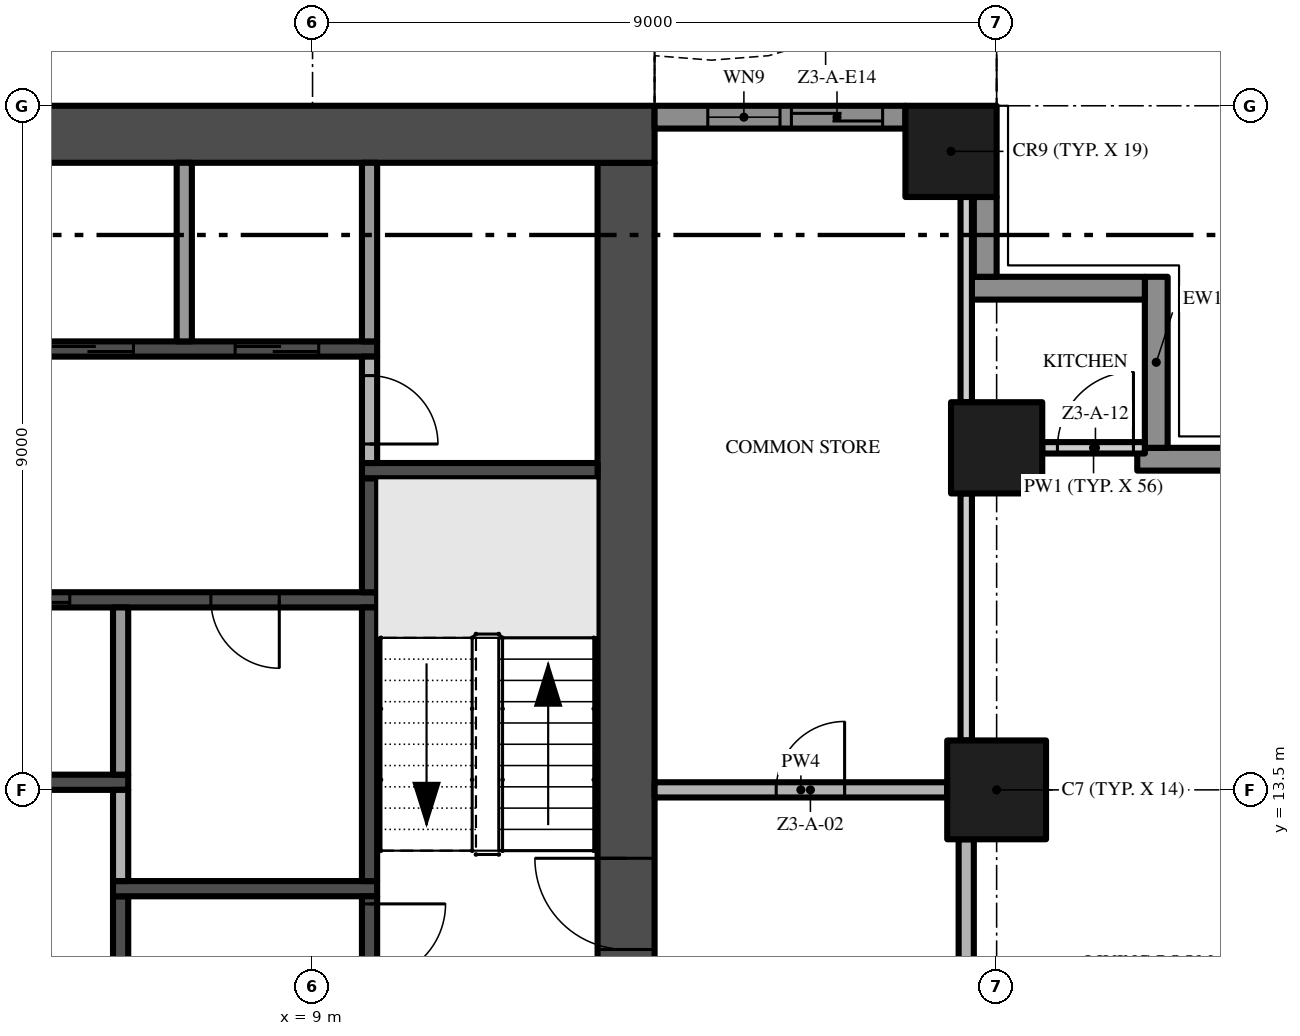
"""IFC4 building model, lengths in metres.
Left out: names, types, materials, properties, quantities, classifications, styles, units other than length and angle.
Written with IfcOpenShell. Run it as: python <this file> out.ifc"""

import sys

from ifc_helpers import new_model, si_unit, direction, frame, frame_2d, origin, origin_2d, place, context, subcontext, project, spatial, polyline, rectangle, outline, extrude, element, fill, save


model = new_model("IFC4")
c1 = context("Model", 3, precision=1e-05, world=origin(), true_north=direction((0.0, 1.0)))
c2 = subcontext(c1, "Body", "Model", "MODEL_VIEW")
j1 = project(units=[si_unit("LENGTHUNIT", "METRE"), si_unit("PLANEANGLEUNIT", "RADIAN")], contexts=[c1])
p1 = place(None, origin())
s1 = spatial("IfcSite", under=j1, at=p1, CompositionType="ELEMENT")
p2 = place(p1, origin())
s2 = spatial("IfcBuilding", under=s1, at=p2, CompositionType="ELEMENT")
p3 = place(p2, frame((0.0, 0.0, 128.8)))
s3 = spatial("IfcBuildingStorey", under=s2, at=p3, CompositionType="ELEMENT", Elevation=128.8)
p4 = place(p3, frame((13.125, 5.25, -0.3), z_axis=(0.0, 0.0, 1.0), x_axis=(0.0, 1.0, 0.0)))
e1 = element("IfcWall", 1, at=p4, inside=s3, PredefinedType="SHEAR", context=c2, shape_type="SweptSolid", body=[
    extrude(rectangle(XDim=16.5, YDim=0.75, at=frame_2d((8.25, 0.0))), origin(), (0.0, 0.0, 1.0), 3.8),
])
p5 = place(p4, frame((6.15, 0.0, 0.3)))
e2 = element("IfcOpeningElement", 2, at=p5, cuts=e1, PredefinedType="OPENING", context=c2, shape_type="SweptSolid", body=[
    extrude(rectangle(XDim=1.2, YDim=2.2, at=frame_2d((0.6, 1.1))), frame((0.0, 0.385, 0.0), z_axis=(0.0, -1.0, 0.0), x_axis=(1.0, 0.0, 0.0)), (0.0, 0.0, 1.0), 0.77),
])
p6 = place(p3, frame((13.5, 22.125, -0.3), z_axis=(0.0, 0.0, 1.0), x_axis=(-1.0, 0.0, 0.0)))
e3 = element("IfcWall", 3, at=p6, inside=s3, PredefinedType="SHEAR", context=c2, shape_type="SweptSolid", body=[
    extrude(rectangle(XDim=27.0, YDim=0.75, at=frame_2d((13.5, 0.0))), origin(), (0.0, 0.0, 1.0), 3.8),
])
p7 = place(p3, frame((18.0, 13.5, 0.0), z_axis=(0.0, 0.0, 1.0), x_axis=(1.0, 0.0, 0.0)))
e4 = element("IfcColumn", 4, at=p7, inside=s3, PredefinedType="COLUMN", context=c2, shape_type="SweptSolid", body=[
    extrude(rectangle(XDim=1.3, YDim=1.3, at=origin_2d()), origin(), (0.0, 0.0, 1.0), 3.5),
])
for number, where, z_axis, x_axis in (
    (5, (17.4, 21.9, 0.0), (0.0, 0.0, 1.0), (1.0, 0.0, 0.0)),
    (6, (18.0, 18.0, 0.0), (0.0, 0.0, 1.0), (1.0, 0.0, 0.0)),
):
    element("IfcColumn", number, at=place(p3, frame(where, z_axis=z_axis, x_axis=x_axis)), inside=s3, PredefinedType="COLUMN", context=c2, shape_type="SweptSolid", body=[
        extrude(rectangle(XDim=1.2, YDim=1.2, at=origin_2d()), origin(), (0.0, 0.0, 1.0), 3.5),
    ])
p8 = place(p3, frame((19.85, 17.85, 0.0), z_axis=(0.0, 0.0, 1.0), x_axis=(1.0, 0.0, 0.0)))
e7 = element("IfcWall", 7, at=p8, inside=s3, PredefinedType="SOLIDWALL", context=c2, shape_type="SweptSolid", body=[
    extrude(rectangle(XDim=2.35, YDim=0.3, at=frame_2d((1.175, 0.0))), origin(), (0.0, 0.0, 1.0), 3.5),
])
p9 = place(p3, frame((20.1, 20.25, 0.0), z_axis=(0.0, 0.0, 1.0), x_axis=(0.0, -1.0, 0.0)))
e8 = element("IfcWall", 8, at=p9, inside=s3, PredefinedType="SOLIDWALL", context=c2, shape_type="SweptSolid", body=[
    extrude(rectangle(XDim=2.25, YDim=0.3, at=frame_2d((1.125, 0.0))), origin(), (0.0, 0.0, 1.0), 3.5),
])
p10 = place(p3, frame((17.6, 20.1, 0.0), z_axis=(0.0, 0.0, 1.0), x_axis=(1.0, 0.0, 0.0)))
e9 = element("IfcWall", 9, at=p10, inside=s3, PredefinedType="SOLIDWALL", context=c2, shape_type="SweptSolid", body=[
    extrude(rectangle(XDim=2.35, YDim=0.3, at=frame_2d((1.175, 0.0))), origin(), (0.0, 0.0, 1.0), 3.5),
])
p11 = place(p3, frame((17.85, 21.3, 0.0), z_axis=(0.0, 0.0, 1.0), x_axis=(0.0, -1.0, 0.0)))
e10 = element("IfcWall", 10, at=p11, inside=s3, PredefinedType="SOLIDWALL", context=c2, shape_type="SweptSolid", body=[
    extrude(rectangle(XDim=1.05, YDim=0.3, at=frame_2d((0.525, 0.0))), origin(), (0.0, 0.0, 1.0), 3.5),
])
p12 = place(p3, frame((13.5, 22.35, 0.0), z_axis=(0.0, 0.0, 1.0), x_axis=(1.0, 0.0, 0.0)))
e11 = element("IfcWall", 11, at=p12, inside=s3, PredefinedType="SOLIDWALL", context=c2, shape_type="SweptSolid", body=[
    extrude(rectangle(XDim=3.3, YDim=0.3, at=frame_2d((1.65, 0.0))), origin(), (0.0, 0.0, 1.0), 3.5),
])
p13 = place(p12, frame((1.8, 0.0, 0.0)))
e12 = element("IfcOpeningElement", 12, at=p13, cuts=e11, PredefinedType="OPENING", context=c2, shape_type="SweptSolid", body=[
    extrude(rectangle(XDim=1.2, YDim=2.4, at=frame_2d((0.6, 1.2))), frame((0.0, 0.16, 0.0), z_axis=(0.0, -1.0, 0.0), x_axis=(1.0, 0.0, 0.0)), (0.0, 0.0, 1.0), 0.32),
])
p14 = place(p12, frame((0.7, 0.0, 0.45)))
e13 = element("IfcOpeningElement", 13, at=p14, cuts=e11, PredefinedType="OPENING", context=c2, shape_type="SweptSolid", body=[
    extrude(rectangle(XDim=0.95, YDim=2.65, at=frame_2d((0.475, 1.325))), frame((0.0, 0.16, 0.0), z_axis=(0.0, -1.0, 0.0), x_axis=(1.0, 0.0, 0.0)), (0.0, 0.0, 1.0), 0.32),
])
p15 = place(p3, origin())
e14 = element("IfcWall", 14, at=p15, inside=s3, PredefinedType="USERDEFINED", context=c2, shape_type="SweptSolid", body=[
    extrude(outline(polyline([(18.0, 24.3), (16.5, 23.595), (15.0, 23.159), (14.25, 23.1), (13.5, 23.159), (13.48, 22.909), (14.25, 22.849), (15.045, 22.911), (16.589, 23.36), (18.106, 24.074), (18.0, 24.3)])), origin(), (0.0, 0.0, 1.0), 0.9),
])
p16 = place(p3, frame((-9.85, 19.3, 0.0), z_axis=(0.0, 0.0, 1.0), x_axis=(1.0, 0.0, 0.0)))
e15 = element("IfcWall", 15, at=p16, inside=s3, PredefinedType="SHEAR", context=c2, shape_type="SweptSolid", body=[
    extrude(rectangle(XDim=19.7, YDim=0.2, at=frame_2d((9.85, 0.0))), origin(), (0.0, 0.0, 1.0), 3.5),
])
p17 = place(p16, frame((10.519, 0.0, 0.0)))
e16 = element("IfcOpeningElement", 16, at=p17, cuts=e15, PredefinedType="OPENING", context=c2, shape_type="SweptSolid", body=[
    extrude(rectangle(XDim=1.1, YDim=2.1, at=frame_2d((0.55, 1.05))), frame((0.0, 0.11, 0.0), z_axis=(0.0, -1.0, 0.0), x_axis=(1.0, 0.0, 0.0)), (0.0, 0.0, 1.0), 0.22),
])
p18 = place(p16, frame((12.956, 0.0, 0.0)))
e17 = element("IfcOpeningElement", 17, at=p18, cuts=e15, PredefinedType="OPENING", context=c2, shape_type="SweptSolid", body=[
    extrude(rectangle(XDim=1.1, YDim=2.1, at=frame_2d((0.55, 1.05))), frame((0.0, 0.11, 0.0), z_axis=(0.0, -1.0, 0.0), x_axis=(1.0, 0.0, 0.0)), (0.0, 0.0, 1.0), 0.22),
])
p19 = place(p16, frame((15.394, 0.0, 0.0)))
e18 = element("IfcOpeningElement", 18, at=p19, cuts=e15, PredefinedType="OPENING", context=c2, shape_type="SweptSolid", body=[
    extrude(rectangle(XDim=1.1, YDim=2.1, at=frame_2d((0.55, 1.05))), frame((0.0, 0.11, 0.0), z_axis=(0.0, -1.0, 0.0), x_axis=(1.0, 0.0, 0.0)), (0.0, 0.0, 1.0), 0.22),
])
p20 = place(p16, frame((17.831, 0.0, 0.0)))
e19 = element("IfcOpeningElement", 19, at=p20, cuts=e15, PredefinedType="OPENING", context=c2, shape_type="SweptSolid", body=[
    extrude(rectangle(XDim=1.1, YDim=2.1, at=frame_2d((0.55, 1.05))), frame((0.0, 0.11, 0.0), z_axis=(0.0, -1.0, 0.0), x_axis=(1.0, 0.0, 0.0)), (0.0, 0.0, 1.0), 0.22),
])
p21 = place(p16, frame((3.306, 0.0, 0.0)))
e20 = element("IfcOpeningElement", 20, at=p21, cuts=e15, PredefinedType="OPENING", context=c2, shape_type="SweptSolid", body=[
    extrude(rectangle(XDim=0.9, YDim=2.1, at=frame_2d((0.45, 1.05))), frame((0.0, 0.11, 0.0), z_axis=(0.0, -1.0, 0.0), x_axis=(1.0, 0.0, 0.0)), (0.0, 0.0, 1.0), 0.22),
])
p22 = place(p16, frame((8.181, 0.0, 0.0)))
e21 = element("IfcOpeningElement", 21, at=p22, cuts=e15, PredefinedType="OPENING", context=c2, shape_type="SweptSolid", body=[
    extrude(rectangle(XDim=0.9, YDim=2.1, at=frame_2d((0.45, 1.05))), frame((0.0, 0.11, 0.0), z_axis=(0.0, -1.0, 0.0), x_axis=(1.0, 0.0, 0.0)), (0.0, 0.0, 1.0), 0.22),
])
p23 = place(p3, frame((1.5, 13.6, 0.0), z_axis=(0.0, 0.0, 1.0), x_axis=(1.0, 0.0, 0.0)))
e22 = element("IfcWall", 22, at=p23, inside=s3, PredefinedType="SHEAR", context=c2, shape_type="SweptSolid", body=[
    extrude(rectangle(XDim=5.075, YDim=0.2, at=frame_2d((2.538, 0.0))), origin(), (0.0, 0.0, 1.0), 3.5),
])
p24 = place(p3, frame((9.85, 16.0, 0.0), z_axis=(0.0, 0.0, 1.0), x_axis=(-1.0, 0.0, 0.0)))
e23 = element("IfcWall", 23, at=p24, inside=s3, PredefinedType="SHEAR", context=c2, shape_type="SweptSolid", body=[
    extrude(rectangle(XDim=8.35, YDim=0.2, at=frame_2d((4.175, 0.0))), origin(), (0.0, 0.0, 1.0), 3.5),
])
p25 = place(p24, frame((6.481, 0.0, 0.0)))
e24 = element("IfcOpeningElement", 24, at=p25, cuts=e23, PredefinedType="OPENING", context=c2, shape_type="SweptSolid", body=[
    extrude(rectangle(XDim=1.1, YDim=2.1, at=frame_2d((0.55, 1.05))), frame((0.0, 0.11, 0.0), z_axis=(0.0, -1.0, 0.0), x_axis=(1.0, 0.0, 0.0)), (0.0, 0.0, 1.0), 0.22),
])
p26 = place(p24, frame((4.044, 0.0, 0.0)))
e25 = element("IfcOpeningElement", 25, at=p26, cuts=e23, PredefinedType="OPENING", context=c2, shape_type="SweptSolid", body=[
    extrude(rectangle(XDim=1.1, YDim=2.1, at=frame_2d((0.55, 1.05))), frame((0.0, 0.11, 0.0), z_axis=(0.0, -1.0, 0.0), x_axis=(1.0, 0.0, 0.0)), (0.0, 0.0, 1.0), 0.22),
])
p27 = place(p24, frame((1.288, 0.0, 0.0)))
e26 = element("IfcOpeningElement", 26, at=p27, cuts=e23, PredefinedType="OPENING", context=c2, shape_type="SweptSolid", body=[
    extrude(rectangle(XDim=0.9, YDim=2.1, at=frame_2d((0.45, 1.05))), frame((0.0, 0.11, 0.0), z_axis=(0.0, -1.0, 0.0), x_axis=(1.0, 0.0, 0.0)), (0.0, 0.0, 1.0), 0.22),
])
p28 = place(p3, frame((6.475, 9.4, 0.0), z_axis=(0.0, 0.0, 1.0), x_axis=(0.0, 1.0, 0.0)))
e27 = element("IfcWall", 27, at=p28, inside=s3, PredefinedType="SHEAR", context=c2, shape_type="SweptSolid", body=[
    extrude(rectangle(XDim=2.7, YDim=0.2, at=frame_2d((1.35, 0.0))), origin(), (0.0, 0.0, 1.0), 3.5),
])
p29 = place(p3, frame((6.375, 12.2, 0.0), z_axis=(0.0, 0.0, 1.0), x_axis=(1.0, 0.0, 0.0)))
e28 = element("IfcWall", 28, at=p29, inside=s3, PredefinedType="SHEAR", context=c2, shape_type="SweptSolid", body=[
    extrude(rectangle(XDim=3.475, YDim=0.2, at=frame_2d((1.738, 0.0))), origin(), (0.0, 0.0, 1.0), 3.5),
])
p30 = place(p3, frame((6.475, 12.3, 0.0), z_axis=(0.0, 0.0, 1.0), x_axis=(0.0, 1.0, 0.0)))
e29 = element("IfcWall", 29, at=p30, inside=s3, PredefinedType="PARTITIONING", context=c2, shape_type="SweptSolid", body=[
    extrude(rectangle(XDim=1.2, YDim=0.2, at=frame_2d((0.6, 0.0))), origin(), (0.0, 0.0, 1.0), 3.5),
])
p31 = place(p3, frame((6.475, 13.7, 0.0), z_axis=(0.0, 0.0, 1.0), x_axis=(0.0, 1.0, 0.0)))
e30 = element("IfcWall", 30, at=p31, inside=s3, PredefinedType="PARTITIONING", context=c2, shape_type="SweptSolid", body=[
    extrude(rectangle(XDim=2.2, YDim=0.2, at=frame_2d((1.1, 0.0))), origin(), (0.0, 0.0, 1.0), 3.5),
])
p32 = place(p3, frame((7.312, 19.4, 0.0), z_axis=(0.0, 0.0, 1.0), x_axis=(0.0, 1.0, 0.0)))
e31 = element("IfcWall", 31, at=p32, inside=s3, PredefinedType="PARTITIONING", context=c2, shape_type="SweptSolid", body=[
    extrude(rectangle(XDim=2.35, YDim=0.2, at=frame_2d((1.175, 0.0))), origin(), (0.0, 0.0, 1.0), 3.5),
])
p33 = place(p3, frame((9.75, 12.1, 0.0), z_axis=(0.0, 0.0, 1.0), x_axis=(0.0, -1.0, 0.0)))
e32 = element("IfcWall", 32, at=p33, inside=s3, PredefinedType="SHEAR", context=c2, shape_type="SweptSolid", body=[
    extrude(rectangle(XDim=1.9, YDim=0.2, at=frame_2d((0.95, 0.0))), origin(), (0.0, 0.0, 1.0), 3.5),
])
p34 = place(p33, frame((0.1, 0.0, 0.0)))
e33 = element("IfcOpeningElement", 33, at=p34, cuts=e32, PredefinedType="OPENING", context=c2, shape_type="SweptSolid", body=[
    extrude(rectangle(XDim=1.0, YDim=2.2, at=frame_2d((0.5, 1.1))), frame((0.0, 0.11, 0.0), z_axis=(0.0, -1.0, 0.0), x_axis=(1.0, 0.0, 0.0)), (0.0, 0.0, 1.0), 0.22),
])
p35 = place(p3, frame((9.75, 12.3, 0.0), z_axis=(0.0, 0.0, 1.0), x_axis=(0.0, 1.0, 0.0)))
e34 = element("IfcWall", 34, at=p35, inside=s3, PredefinedType="SHEAR", context=c2, shape_type="SweptSolid", body=[
    extrude(rectangle(XDim=3.6, YDim=0.2, at=frame_2d((1.8, 0.0))), origin(), (0.0, 0.0, 1.0), 3.5),
])
p36 = place(p3, frame((9.75, 16.1, 0.0), z_axis=(0.0, 0.0, 1.0), x_axis=(0.0, 1.0, 0.0)))
e35 = element("IfcWall", 35, at=p36, inside=s3, PredefinedType="SHEAR", context=c2, shape_type="SweptSolid", body=[
    extrude(rectangle(XDim=1.5, YDim=0.2, at=frame_2d((0.75, 0.0))), origin(), (0.0, 0.0, 1.0), 3.5),
])
p37 = place(p3, frame((9.65, 17.7, 0.0), z_axis=(0.0, 0.0, 1.0), x_axis=(1.0, 0.0, 0.0)))
e36 = element("IfcWall", 36, at=p37, inside=s3, PredefinedType="SHEAR", context=c2, shape_type="SweptSolid", body=[
    extrude(rectangle(XDim=3.1, YDim=0.2, at=frame_2d((1.55, 0.0))), origin(), (0.0, 0.0, 1.0), 3.5),
])
p38 = place(p3, frame((9.75, 19.2, 0.0), z_axis=(0.0, 0.0, 1.0), x_axis=(0.0, -1.0, 0.0)))
e37 = element("IfcWall", 37, at=p38, inside=s3, PredefinedType="PARTITIONING", context=c2, shape_type="SweptSolid", body=[
    extrude(rectangle(XDim=1.4, YDim=0.2, at=frame_2d((0.7, 0.0))), origin(), (0.0, 0.0, 1.0), 3.5),
])
p39 = place(p38, frame((0.25, 0.0, 0.0)))
e38 = element("IfcOpeningElement", 38, at=p39, cuts=e37, PredefinedType="OPENING", context=c2, shape_type="SweptSolid", body=[
    extrude(rectangle(XDim=0.9, YDim=2.1, at=frame_2d((0.45, 1.05))), frame((0.0, 0.11, 0.0), z_axis=(0.0, -1.0, 0.0), x_axis=(1.0, 0.0, 0.0)), (0.0, 0.0, 1.0), 0.22),
])
p40 = place(p3, frame((9.75, 19.4, 0.0), z_axis=(0.0, 0.0, 1.0), x_axis=(0.0, 1.0, 0.0)))
e39 = element("IfcWall", 39, at=p40, inside=s3, PredefinedType="PARTITIONING", context=c2, shape_type="SweptSolid", body=[
    extrude(rectangle(XDim=2.35, YDim=0.2, at=frame_2d((1.175, 0.0))), origin(), (0.0, 0.0, 1.0), 3.5),
])
p41 = place(p3, frame((13.5, 13.5, 0.0), z_axis=(0.0, 0.0, 1.0), x_axis=(1.0, 0.0, 0.0)))
e40 = element("IfcWall", 40, at=p41, inside=s3, PredefinedType="PARTITIONING", context=c2, shape_type="SweptSolid", body=[
    extrude(rectangle(XDim=3.85, YDim=0.2, at=frame_2d((1.925, 0.0))), origin(), (0.0, 0.0, 1.0), 3.5),
])
p42 = place(p41, frame((1.6, 0.0, 0.0)))
e41 = element("IfcOpeningElement", 41, at=p42, cuts=e40, PredefinedType="OPENING", context=c2, shape_type="SweptSolid", body=[
    extrude(rectangle(XDim=0.9, YDim=2.1, at=frame_2d((0.45, 1.05))), frame((0.0, 0.11, 0.0), z_axis=(0.0, -1.0, 0.0), x_axis=(1.0, 0.0, 0.0)), (0.0, 0.0, 1.0), 0.22),
])
p43 = place(p3, frame((18.6, 18.0, 0.0), z_axis=(0.0, 0.0, 1.0), x_axis=(1.0, 0.0, 0.0)))
e42 = element("IfcWall", 42, at=p43, inside=s3, PredefinedType="PARTITIONING", context=c2, shape_type="SweptSolid", body=[
    extrude(rectangle(XDim=1.35, YDim=0.15, at=frame_2d((0.675, 0.0))), origin(), (0.0, 0.0, 1.0), 3.5),
])
p44 = place(p43, frame((0.2, 0.0, 0.0)))
e43 = element("IfcOpeningElement", 43, at=p44, cuts=e42, PredefinedType="OPENING", context=c2, shape_type="SweptSolid", body=[
    extrude(rectangle(XDim=1.0, YDim=2.4, at=frame_2d((0.5, 1.2))), frame((0.0, 0.085, 0.0), z_axis=(0.0, -1.0, 0.0), x_axis=(1.0, 0.0, 0.0)), (0.0, 0.0, 1.0), 0.17),
])
p45 = place(p3, frame((17.6, 12.85, 0.0), z_axis=(0.0, 0.0, 1.0), x_axis=(0.0, -1.0, 0.0)))
e44 = element("IfcWall", 44, at=p45, inside=s3, PredefinedType="PARTITIONING", context=c2, shape_type="SweptSolid", body=[
    extrude(rectangle(XDim=7.7, YDim=0.2, at=frame_2d((3.85, 0.0))), origin(), (0.0, 0.0, 1.0), 3.5),
])
p46 = place(p45, frame((5.5, 0.0, 0.0)))
e45 = element("IfcOpeningElement", 45, at=p46, cuts=e44, PredefinedType="OPENING", context=c2, shape_type="SweptSolid", body=[
    extrude(rectangle(XDim=1.2, YDim=2.4, at=frame_2d((0.6, 1.2))), frame((0.0, 0.11, 0.0), z_axis=(0.0, -1.0, 0.0), x_axis=(1.0, 0.0, 0.0)), (0.0, 0.0, 1.0), 0.22),
])
p47 = place(p3, frame((17.6, 14.15, 0.0), z_axis=(0.0, 0.0, 1.0), x_axis=(0.0, 1.0, 0.0)))
e46 = element("IfcWall", 46, at=p47, inside=s3, PredefinedType="PARTITIONING", context=c2, shape_type="SweptSolid", body=[
    extrude(rectangle(XDim=3.25, YDim=0.15, at=frame_2d((1.625, 0.0))), origin(), (0.0, 0.0, 1.0), 3.5),
])
p48 = place(p3, frame((17.6, 18.6, 0.0), z_axis=(0.0, 0.0, 1.0), x_axis=(0.0, 1.0, 0.0)))
e47 = element("IfcWall", 47, at=p48, inside=s3, PredefinedType="PARTITIONING", context=c2, shape_type="SweptSolid", body=[
    extrude(rectangle(XDim=2.7, YDim=0.15, at=frame_2d((1.35, 0.0))), origin(), (0.0, 0.0, 1.0), 3.5),
])
p49 = place(p13, origin())
e48 = element("IfcDoor", 48, at=p49, inside=s3, OperationType="SINGLE_SWING_LEFT", PredefinedType="DOOR", context=c2, shape_type="SweptSolid", body=[
    extrude(rectangle(XDim=1.2, YDim=2.4, at=frame_2d((0.6, 1.2))), frame((0.0, 0.025, 0.0), z_axis=(0.0, -1.0, 0.0), x_axis=(1.0, 0.0, 0.0)), (0.0, 0.0, 1.0), 0.05),
])
fill(e12, e48)
p50 = place(p14, origin())
e49 = element("IfcWindow", 49, at=p50, inside=s3, PartitioningType="SINGLE_PANEL", PredefinedType="WINDOW", context=c2, shape_type="SweptSolid", body=[
    extrude(rectangle(XDim=0.95, YDim=2.65, at=frame_2d((0.475, 1.325))), frame((0.0, 0.03, 0.0), z_axis=(0.0, -1.0, 0.0), x_axis=(1.0, 0.0, 0.0)), (0.0, 0.0, 1.0), 0.06),
])
fill(e13, e49)
p51 = place(p5, frame((1.2, 0.0, 0.0), z_axis=(0.0, 0.0, 1.0), x_axis=(-1.0, 0.0, 0.0)))
e50 = element("IfcDoor", 50, at=p51, inside=s3, OperationType="SINGLE_SWING_LEFT", PredefinedType="DOOR", context=c2, shape_type="SweptSolid", body=[
    extrude(rectangle(XDim=1.2, YDim=2.2, at=frame_2d((0.6, 1.1))), frame((0.0, 0.025, 0.0), z_axis=(0.0, -1.0, 0.0), x_axis=(1.0, 0.0, 0.0)), (0.0, 0.0, 1.0), 0.05),
])
fill(e2, e50)
p52 = place(p34, origin())
e51 = element("IfcDoor", 51, at=p52, inside=s3, OperationType="SINGLE_SWING_LEFT", PredefinedType="DOOR", context=c2, shape_type="SweptSolid", body=[
    extrude(rectangle(XDim=1.0, YDim=2.2, at=frame_2d((0.5, 1.1))), frame((0.0, 0.025, 0.0), z_axis=(0.0, -1.0, 0.0), x_axis=(1.0, 0.0, 0.0)), (0.0, 0.0, 1.0), 0.05),
])
fill(e33, e51)
p53 = place(p19, origin())
e52 = element("IfcDoor", 52, at=p53, inside=s3, OperationType="SLIDING_TO_RIGHT", PredefinedType="DOOR", context=c2, shape_type="SweptSolid", body=[
    extrude(rectangle(XDim=1.1, YDim=2.1, at=frame_2d((0.55, 1.05))), frame((0.0, 0.025, 0.0), z_axis=(0.0, -1.0, 0.0), x_axis=(1.0, 0.0, 0.0)), (0.0, 0.0, 1.0), 0.05),
])
fill(e18, e52)
p54 = place(p20, origin())
e53 = element("IfcDoor", 53, at=p54, inside=s3, OperationType="SLIDING_TO_RIGHT", PredefinedType="DOOR", context=c2, shape_type="SweptSolid", body=[
    extrude(rectangle(XDim=1.1, YDim=2.1, at=frame_2d((0.55, 1.05))), frame((0.0, 0.025, 0.0), z_axis=(0.0, -1.0, 0.0), x_axis=(1.0, 0.0, 0.0)), (0.0, 0.0, 1.0), 0.05),
])
fill(e19, e53)
p55 = place(p26, origin())
e54 = element("IfcDoor", 54, at=p55, inside=s3, OperationType="SLIDING_TO_RIGHT", PredefinedType="DOOR", context=c2, shape_type="SweptSolid", body=[
    extrude(rectangle(XDim=1.1, YDim=2.1, at=frame_2d((0.55, 1.05))), frame((0.0, 0.025, 0.0), z_axis=(0.0, -1.0, 0.0), x_axis=(1.0, 0.0, 0.0)), (0.0, 0.0, 1.0), 0.05),
])
fill(e25, e54)
p56 = place(p27, origin())
e55 = element("IfcDoor", 55, at=p56, inside=s3, OperationType="SINGLE_SWING_LEFT", PredefinedType="DOOR", context=c2, shape_type="SweptSolid", body=[
    extrude(rectangle(XDim=0.9, YDim=2.1, at=frame_2d((0.45, 1.05))), frame((0.0, 0.025, 0.0), z_axis=(0.0, -1.0, 0.0), x_axis=(1.0, 0.0, 0.0)), (0.0, 0.0, 1.0), 0.05),
])
fill(e26, e55)
p57 = place(p39, origin())
e56 = element("IfcDoor", 56, at=p57, inside=s3, OperationType="SINGLE_SWING_RIGHT", PredefinedType="DOOR", context=c2, shape_type="SweptSolid", body=[
    extrude(rectangle(XDim=0.9, YDim=2.1, at=frame_2d((0.45, 1.05))), frame((0.0, 0.025, 0.0), z_axis=(0.0, -1.0, 0.0), x_axis=(1.0, 0.0, 0.0)), (0.0, 0.0, 1.0), 0.05),
])
fill(e38, e56)
p58 = place(p42, origin())
e57 = element("IfcDoor", 57, at=p58, inside=s3, OperationType="SINGLE_SWING_RIGHT", PredefinedType="DOOR", context=c2, shape_type="SweptSolid", body=[
    extrude(rectangle(XDim=0.9, YDim=2.1, at=frame_2d((0.45, 1.05))), frame((0.0, 0.025, 0.0), z_axis=(0.0, -1.0, 0.0), x_axis=(1.0, 0.0, 0.0)), (0.0, 0.0, 1.0), 0.05),
])
fill(e41, e57)
p59 = place(p44, origin())
e58 = element("IfcDoor", 58, at=p59, inside=s3, OperationType="SINGLE_SWING_RIGHT", PredefinedType="DOOR", context=c2, shape_type="SweptSolid", body=[
    extrude(rectangle(XDim=1.0, YDim=2.4, at=frame_2d((0.5, 1.2))), frame((0.0, 0.025, 0.0), z_axis=(0.0, -1.0, 0.0), x_axis=(1.0, 0.0, 0.0)), (0.0, 0.0, 1.0), 0.05),
])
fill(e43, e58)
save(model, sys.argv[1])
